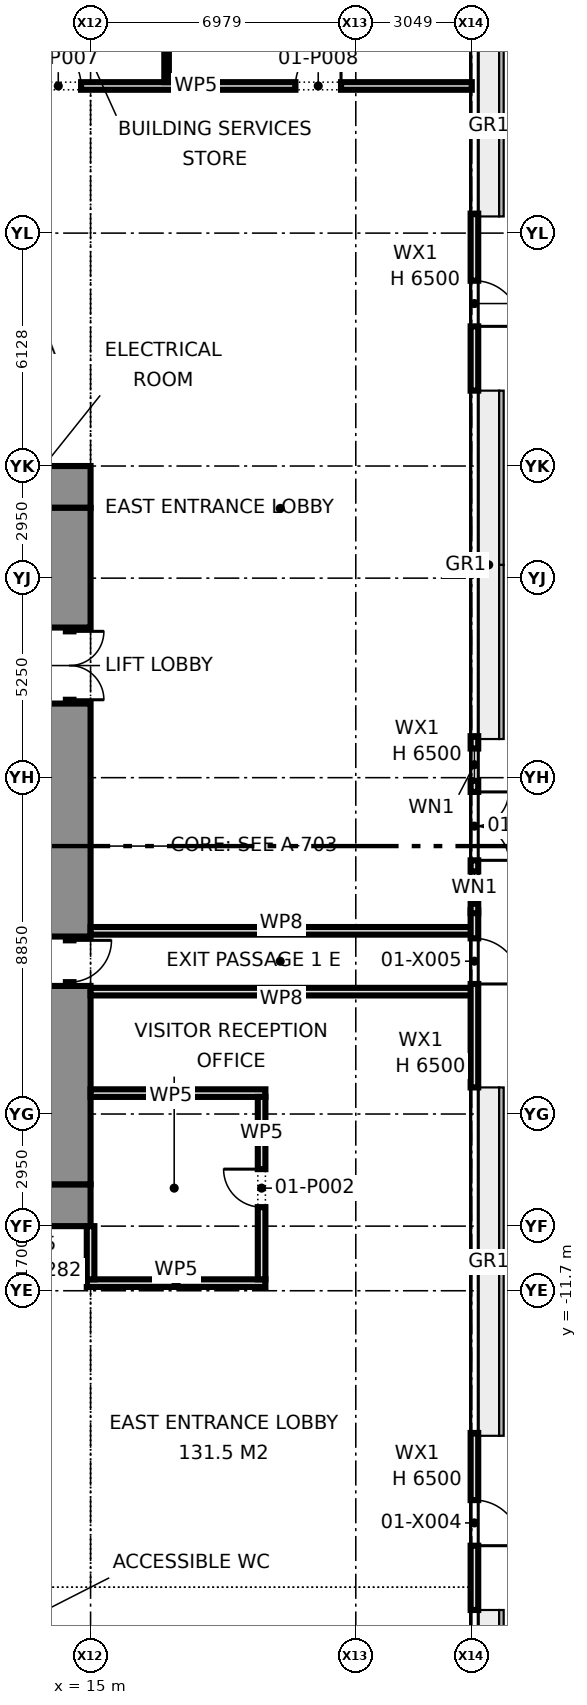
"""IFC4 building model, lengths in metres.
Left out: names, types, materials, properties, quantities, classifications, styles, units other than length and angle.
Written with IfcOpenShell. Run it as: python <this file> out.ifc"""

import sys

from ifc_helpers import new_model, si_unit, direction, frame, frame_2d, origin, place, context, subcontext, project, spatial, rectangle, extrude, element, fill, save


model = new_model("IFC4")
c1 = context("Model", 3, precision=1e-05, world=origin(), true_north=direction((0.0, 1.0)))
c2 = subcontext(c1, "Body", "Model", "MODEL_VIEW")
j1 = project(units=[si_unit("LENGTHUNIT", "METRE"), si_unit("PLANEANGLEUNIT", "RADIAN")], contexts=[c1])
p1 = place(None, origin())
s1 = spatial("IfcSite", under=j1, at=p1, CompositionType="ELEMENT")
p2 = place(p1, origin())
s2 = spatial("IfcBuilding", under=s1, at=p2, CompositionType="ELEMENT")
p3 = place(p2, origin())
s3 = spatial("IfcBuildingStorey", under=s2, at=p3, CompositionType="ELEMENT", Elevation=0.0)
p4 = place(p3, frame((25.1, -20.1, 0.0), z_axis=(0.0, 0.0, 1.0), x_axis=(0.0, 1.0, 0.0)))
e1 = element("IfcWall", 1, at=p4, inside=s3, PredefinedType="STANDARD", context=c2, shape_type="SweptSolid", body=[
    extrude(rectangle(XDim=4.658, YDim=0.2, at=frame_2d((2.329, 0.0))), origin(), (0.0, 0.0, 1.0), 6.5),
])
p5 = place(p4, frame((1.692, 0.0, 0.0)))
e2 = element("IfcOpeningElement", 2, at=p5, cuts=e1, PredefinedType="OPENING", context=c2, shape_type="SweptSolid", body=[
    extrude(rectangle(XDim=1.2, YDim=2.1, at=frame_2d((0.6, 1.05))), frame((0.0, 0.11, 0.0), z_axis=(0.0, -1.0, 0.0), x_axis=(1.0, 0.0, 0.0)), (0.0, 0.0, 1.0), 0.22),
])
p6 = place(p3, frame((25.1, -6.35, 0.0), z_axis=(0.0, 0.0, 1.0), x_axis=(0.0, 1.0, 0.0)))
e3 = element("IfcWall", 3, at=p6, inside=s3, PredefinedType="STANDARD", context=c2, shape_type="SweptSolid", body=[
    extrude(rectangle(XDim=4.658, YDim=0.2, at=frame_2d((2.329, 0.0))), origin(), (0.0, 0.0, 1.0), 6.5),
])
p7 = place(p6, frame((2.722, 0.0, 0.0)))
e4 = element("IfcOpeningElement", 4, at=p7, cuts=e3, PredefinedType="OPENING", context=c2, shape_type="SweptSolid", body=[
    extrude(rectangle(XDim=1.2, YDim=2.1, at=frame_2d((0.6, 1.05))), frame((0.0, 0.11, 0.0), z_axis=(0.0, -1.0, 0.0), x_axis=(1.0, 0.0, 0.0)), (0.0, 0.0, 1.0), 0.22),
])
p8 = place(p3, frame((25.1, -1.767, 0.0), z_axis=(0.0, 0.0, 1.0), x_axis=(0.0, 1.0, 0.0)))
e5 = element("IfcWall", 5, at=p8, inside=s3, PredefinedType="STANDARD", context=c2, shape_type="SweptSolid", body=[
    extrude(rectangle(XDim=4.658, YDim=0.2, at=frame_2d((2.329, 0.0))), origin(), (0.0, 0.0, 1.0), 6.5),
])
p9 = place(p8, frame((1.392, 0.0, 0.0)))
e6 = element("IfcOpeningElement", 6, at=p9, cuts=e5, PredefinedType="OPENING", context=c2, shape_type="SweptSolid", body=[
    extrude(rectangle(XDim=1.8, YDim=2.4, at=frame_2d((0.9, 1.2))), frame((0.0, 0.11, 0.0), z_axis=(0.0, -1.0, 0.0), x_axis=(1.0, 0.0, 0.0)), (0.0, 0.0, 1.0), 0.22),
])
p10 = place(p8, frame((0.25, 0.0, 0.0)))
e7 = element("IfcOpeningElement", 7, at=p10, cuts=e5, PredefinedType="OPENING", context=c2, shape_type="SweptSolid", body=[
    extrude(rectangle(XDim=0.85, YDim=2.4, at=frame_2d((0.425, 1.2))), frame((0.0, 0.11, 0.0), z_axis=(0.0, -1.0, 0.0), x_axis=(1.0, 0.0, 0.0)), (0.0, 0.0, 1.0), 0.22),
])
p11 = place(p8, frame((3.483, 0.0, 0.0)))
e8 = element("IfcOpeningElement", 8, at=p11, cuts=e5, PredefinedType="OPENING", context=c2, shape_type="SweptSolid", body=[
    extrude(rectangle(XDim=0.85, YDim=2.4, at=frame_2d((0.425, 1.2))), frame((0.0, 0.11, 0.0), z_axis=(0.0, -1.0, 0.0), x_axis=(1.0, 0.0, 0.0)), (0.0, 0.0, 1.0), 0.22),
])
p12 = place(p3, frame((25.1, 11.983, 0.0), z_axis=(0.0, 0.0, 1.0), x_axis=(0.0, 1.0, 0.0)))
e9 = element("IfcWall", 9, at=p12, inside=s3, PredefinedType="STANDARD", context=c2, shape_type="SweptSolid", body=[
    extrude(rectangle(XDim=4.658, YDim=0.2, at=frame_2d((2.329, 0.0))), origin(), (0.0, 0.0, 1.0), 6.5),
])
p13 = place(p12, frame((1.692, 0.0, 0.0)))
e10 = element("IfcOpeningElement", 10, at=p13, cuts=e9, PredefinedType="OPENING", context=c2, shape_type="SweptSolid", body=[
    extrude(rectangle(XDim=1.2, YDim=2.1, at=frame_2d((0.6, 1.05))), frame((0.0, 0.11, 0.0), z_axis=(0.0, -1.0, 0.0), x_axis=(1.0, 0.0, 0.0)), (0.0, 0.0, 1.0), 0.22),
])
for number, where, z_axis, x_axis in (
    (11, (15.0, 9.45, 0.0), (0.0, 0.0, 1.0), (-1.0, 0.0, 0.0)),
    (12, (15.0, -9.45, 0.0), (0.0, 0.0, 1.0), (-1.0, 0.0, 0.0)),
):
    element("IfcWall", number, at=place(p3, frame(where, z_axis=z_axis, x_axis=x_axis)), inside=s3, PredefinedType="SHEAR", context=c2, shape_type="SweptSolid", body=[
        extrude(rectangle(XDim=11.0, YDim=1.1, at=frame_2d((5.5, 0.0))), origin(), (0.0, 0.0, 1.0), 6.275),
    ])
p14 = place(p3, frame((14.45, 8.9, 0.0), z_axis=(0.0, 0.0, 1.0), x_axis=(0.0, -1.0, 0.0)))
e13 = element("IfcWall", 13, at=p14, inside=s3, PredefinedType="SHEAR", context=c2, shape_type="SweptSolid", body=[
    extrude(rectangle(XDim=3.15, YDim=1.1, at=frame_2d((1.575, 0.0))), origin(), (0.0, 0.0, 1.0), 6.275),
])
p15 = place(p3, frame((14.45, 5.75, 0.0), z_axis=(0.0, 0.0, 1.0), x_axis=(0.0, -1.0, 0.0)))
e14 = element("IfcWall", 14, at=p15, inside=s3, PredefinedType="PARTITIONING", context=c2, shape_type="SweptSolid", body=[
    extrude(rectangle(XDim=2.0, YDim=0.2, at=frame_2d((1.0, 0.0))), origin(), (0.0, 0.0, 1.0), 2.4),
])
p16 = place(p15, frame((0.1, 0.0, 0.0)))
e15 = element("IfcOpeningElement", 15, at=p16, cuts=e14, PredefinedType="OPENING", context=c2, shape_type="SweptSolid", body=[
    extrude(rectangle(XDim=1.8, YDim=2.1, at=frame_2d((0.9, 1.05))), frame((0.0, 0.11, 0.0), z_axis=(0.0, -1.0, 0.0), x_axis=(1.0, 0.0, 0.0)), (0.0, 0.0, 1.0), 0.22),
])
p17 = place(p3, frame((14.45, 3.75, 0.0), z_axis=(0.0, 0.0, 1.0), x_axis=(0.0, -1.0, 0.0)))
e16 = element("IfcWall", 16, at=p17, inside=s3, PredefinedType="SHEAR", context=c2, shape_type="SweptSolid", body=[
    extrude(rectangle(XDim=6.13, YDim=1.1, at=frame_2d((3.065, 0.0))), origin(), (0.0, 0.0, 1.0), 6.275),
])
p18 = place(p3, frame((14.45, -2.38, 0.0), z_axis=(0.0, 0.0, 1.0), x_axis=(0.0, -1.0, 0.0)))
e17 = element("IfcWall", 17, at=p18, inside=s3, PredefinedType="SHEAR", context=c2, shape_type="SweptSolid", body=[
    extrude(rectangle(XDim=1.3, YDim=0.2, at=frame_2d((0.65, 0.0))), origin(), (0.0, 0.0, 1.0), 2.4),
])
p19 = place(p18, frame((0.1, 0.0, 0.0)))
e18 = element("IfcOpeningElement", 18, at=p19, cuts=e17, PredefinedType="OPENING", context=c2, shape_type="SweptSolid", body=[
    extrude(rectangle(XDim=1.1, YDim=2.1, at=frame_2d((0.55, 1.05))), frame((0.0, 0.11, 0.0), z_axis=(0.0, -1.0, 0.0), x_axis=(1.0, 0.0, 0.0)), (0.0, 0.0, 1.0), 0.22),
])
p20 = place(p3, frame((14.45, -3.68, 0.0), z_axis=(0.0, 0.0, 1.0), x_axis=(0.0, -1.0, 0.0)))
e19 = element("IfcWall", 19, at=p20, inside=s3, PredefinedType="SHEAR", context=c2, shape_type="SweptSolid", body=[
    extrude(rectangle(XDim=5.22, YDim=1.1, at=frame_2d((2.61, 0.0))), origin(), (0.0, 0.0, 1.0), 6.275),
])
p21 = place(p3, frame((14.9, -11.5, 0.0), z_axis=(0.0, 0.0, 1.0), x_axis=(1.0, 0.0, 0.0)))
e20 = element("IfcWall", 20, at=p21, inside=s3, PredefinedType="PARTITIONING", context=c2, shape_type="SweptSolid", body=[
    extrude(rectangle(XDim=4.7, YDim=0.2, at=frame_2d((2.35, 0.0))), origin(), (0.0, 0.0, 1.0), 6.275),
])
p22 = place(p3, frame((15.0, -6.5, 0.0), z_axis=(0.0, 0.0, 1.0), x_axis=(1.0, 0.0, 0.0)))
e21 = element("IfcWall", 21, at=p22, inside=s3, PredefinedType="PARTITIONING", context=c2, shape_type="SweptSolid", body=[
    extrude(rectangle(XDim=4.6, YDim=0.2, at=frame_2d((2.3, 0.0))), origin(), (0.0, 0.0, 1.0), 6.275),
])
p23 = place(p3, frame((11.2, 20.0, 0.0), z_axis=(0.0, 0.0, 1.0), x_axis=(1.0, 0.0, 0.0)))
e22 = element("IfcWall", 22, at=p23, inside=s3, PredefinedType="PARTITIONING", context=c2, shape_type="SweptSolid", body=[
    extrude(rectangle(XDim=13.83, YDim=0.2, at=frame_2d((6.915, 0.0))), origin(), (0.0, 0.0, 1.0), 6.275),
])
p24 = place(p23, frame((2.35, 0.0, 0.0)))
e23 = element("IfcOpeningElement", 23, at=p24, cuts=e22, PredefinedType="OPENING", context=c2, shape_type="SweptSolid", body=[
    extrude(rectangle(XDim=1.2, YDim=2.1, at=frame_2d((0.6, 1.05))), frame((0.0, 0.11, 0.0), z_axis=(0.0, -1.0, 0.0), x_axis=(1.0, 0.0, 0.0)), (0.0, 0.0, 1.0), 0.22),
])
p25 = place(p23, frame((9.19, 0.0, 0.0)))
e24 = element("IfcOpeningElement", 24, at=p25, cuts=e22, PredefinedType="OPENING", context=c2, shape_type="SweptSolid", body=[
    extrude(rectangle(XDim=1.2, YDim=2.1, at=frame_2d((0.6, 1.05))), frame((0.0, 0.11, 0.0), z_axis=(0.0, -1.0, 0.0), x_axis=(1.0, 0.0, 0.0)), (0.0, 0.0, 1.0), 0.22),
])
p26 = place(p3, frame((19.5, -11.4, 0.0), z_axis=(0.0, 0.0, 1.0), x_axis=(0.0, 1.0, 0.0)))
e25 = element("IfcWall", 25, at=p26, inside=s3, PredefinedType="PARTITIONING", context=c2, shape_type="SweptSolid", body=[
    extrude(rectangle(XDim=4.8, YDim=0.2, at=frame_2d((2.4, 0.0))), origin(), (0.0, 0.0, 1.0), 6.275),
])
p27 = place(p26, frame((1.9, 0.0, 0.0)))
e26 = element("IfcOpeningElement", 26, at=p27, cuts=e25, PredefinedType="OPENING", context=c2, shape_type="SweptSolid", body=[
    extrude(rectangle(XDim=1.0, YDim=2.1, at=frame_2d((0.5, 1.05))), frame((0.0, 0.11, 0.0), z_axis=(0.0, -1.0, 0.0), x_axis=(1.0, 0.0, 0.0)), (0.0, 0.0, 1.0), 0.22),
])
p28 = place(p3, frame((15.0, -11.4, 0.0), z_axis=(0.0, 0.0, 1.0), x_axis=(0.0, 1.0, 0.0)))
e27 = element("IfcWall", 27, at=p28, inside=s3, PredefinedType="PARTITIONING", context=c2, shape_type="SweptSolid", body=[
    extrude(rectangle(XDim=1.4, YDim=0.2, at=frame_2d((0.7, 0.0))), origin(), (0.0, 0.0, 1.0), 5.282),
])
p29 = place(p3, frame((17.0, 20.1, 0.0), z_axis=(0.0, 0.0, 1.0), x_axis=(0.0, 1.0, 0.0)))
e28 = element("IfcWall", 28, at=p29, inside=s3, PredefinedType="PARTITIONING", context=c2, shape_type="SweptSolid", body=[
    extrude(rectangle(XDim=4.93, YDim=0.12, at=frame_2d((2.465, 0.0))), origin(), (0.0, 0.0, 1.0), 6.275),
])
for number, where, z_axis, x_axis in (
    (29, (15.0, -3.83, 0.0), (0.0, 0.0, 1.0), (1.0, 0.0, 0.0)),
    (30, (15.0, -2.23, 0.0), (0.0, 0.0, 1.0), (1.0, 0.0, 0.0)),
):
    element("IfcWall", number, at=place(p3, frame(where, z_axis=z_axis, x_axis=x_axis)), inside=s3, PredefinedType="PARTITIONING", context=c2, shape_type="SweptSolid", body=[
        extrude(rectangle(XDim=10.03, YDim=0.2, at=frame_2d((5.015, 0.0))), origin(), (0.0, 0.0, 1.0), 6.275),
    ])
p30 = place(p5, frame((1.2, 0.0, 0.0), z_axis=(0.0, 0.0, 1.0), x_axis=(-1.0, 0.0, 0.0)))
e31 = element("IfcDoor", 31, at=p30, inside=s3, OperationType="SINGLE_SWING_RIGHT", PredefinedType="DOOR", context=c2, shape_type="SweptSolid", body=[
    extrude(rectangle(XDim=1.2, YDim=2.1, at=frame_2d((0.6, 1.05))), frame((0.0, 0.025, 0.0), z_axis=(0.0, -1.0, 0.0), x_axis=(1.0, 0.0, 0.0)), (0.0, 0.0, 1.0), 0.05),
])
fill(e2, e31)
p31 = place(p7, frame((1.2, 0.0, 0.0), z_axis=(0.0, 0.0, 1.0), x_axis=(-1.0, 0.0, 0.0)))
e32 = element("IfcDoor", 32, at=p31, inside=s3, OperationType="SINGLE_SWING_RIGHT", PredefinedType="DOOR", context=c2, shape_type="SweptSolid", body=[
    extrude(rectangle(XDim=1.2, YDim=2.1, at=frame_2d((0.6, 1.05))), frame((0.0, 0.025, 0.0), z_axis=(0.0, -1.0, 0.0), x_axis=(1.0, 0.0, 0.0)), (0.0, 0.0, 1.0), 0.05),
])
fill(e4, e32)
p32 = place(p9, frame((1.8, 0.0, 0.0), z_axis=(0.0, 0.0, 1.0), x_axis=(-1.0, 0.0, 0.0)))
e33 = element("IfcDoor", 33, at=p32, inside=s3, OperationType="DOUBLE_DOOR_DOUBLE_SWING", PredefinedType="DOOR", context=c2, shape_type="SweptSolid", body=[
    extrude(rectangle(XDim=1.8, YDim=2.4, at=frame_2d((0.9, 1.2))), frame((0.0, 0.025, 0.0), z_axis=(0.0, -1.0, 0.0), x_axis=(1.0, 0.0, 0.0)), (0.0, 0.0, 1.0), 0.05),
])
fill(e6, e33)
p33 = place(p10, origin())
e34 = element("IfcWindow", 34, at=p33, inside=s3, PartitioningType="SINGLE_PANEL", PredefinedType="WINDOW", context=c2, shape_type="SweptSolid", body=[
    extrude(rectangle(XDim=0.85, YDim=2.4, at=frame_2d((0.425, 1.2))), frame((0.0, 0.03, 0.0), z_axis=(0.0, -1.0, 0.0), x_axis=(1.0, 0.0, 0.0)), (0.0, 0.0, 1.0), 0.06),
])
fill(e7, e34)
p34 = place(p11, origin())
e35 = element("IfcWindow", 35, at=p34, inside=s3, PartitioningType="SINGLE_PANEL", PredefinedType="WINDOW", context=c2, shape_type="SweptSolid", body=[
    extrude(rectangle(XDim=0.85, YDim=2.4, at=frame_2d((0.425, 1.2))), frame((0.0, 0.03, 0.0), z_axis=(0.0, -1.0, 0.0), x_axis=(1.0, 0.0, 0.0)), (0.0, 0.0, 1.0), 0.06),
])
fill(e8, e35)
p35 = place(p13, frame((1.2, 0.0, 0.0), z_axis=(0.0, 0.0, 1.0), x_axis=(-1.0, 0.0, 0.0)))
e36 = element("IfcDoor", 36, at=p35, inside=s3, OperationType="SINGLE_SWING_RIGHT", PredefinedType="DOOR", context=c2, shape_type="SweptSolid", body=[
    extrude(rectangle(XDim=1.2, YDim=2.1, at=frame_2d((0.6, 1.05))), frame((0.0, 0.025, 0.0), z_axis=(0.0, -1.0, 0.0), x_axis=(1.0, 0.0, 0.0)), (0.0, 0.0, 1.0), 0.05),
])
fill(e10, e36)
p36 = place(p16, origin())
e37 = element("IfcDoor", 37, at=p36, inside=s3, OperationType="DOUBLE_DOOR_SINGLE_SWING", PredefinedType="DOOR", context=c2, shape_type="SweptSolid", body=[
    extrude(rectangle(XDim=1.8, YDim=2.1, at=frame_2d((0.9, 1.05))), frame((0.0, 0.025, 0.0), z_axis=(0.0, -1.0, 0.0), x_axis=(1.0, 0.0, 0.0)), (0.0, 0.0, 1.0), 0.05),
])
fill(e15, e37)
p37 = place(p19, origin())
e38 = element("IfcDoor", 38, at=p37, inside=s3, OperationType="SINGLE_SWING_LEFT", PredefinedType="DOOR", context=c2, shape_type="SweptSolid", body=[
    extrude(rectangle(XDim=1.1, YDim=2.1, at=frame_2d((0.55, 1.05))), frame((0.0, 0.025, 0.0), z_axis=(0.0, -1.0, 0.0), x_axis=(1.0, 0.0, 0.0)), (0.0, 0.0, 1.0), 0.05),
])
fill(e18, e38)
p38 = place(p27, origin())
e39 = element("IfcDoor", 39, at=p38, inside=s3, OperationType="SINGLE_SWING_RIGHT", PredefinedType="DOOR", context=c2, shape_type="SweptSolid", body=[
    extrude(rectangle(XDim=1.0, YDim=2.1, at=frame_2d((0.5, 1.05))), frame((0.0, 0.025, 0.0), z_axis=(0.0, -1.0, 0.0), x_axis=(1.0, 0.0, 0.0)), (0.0, 0.0, 1.0), 0.05),
])
fill(e26, e39)
p39 = place(p24, origin())
e40 = element("IfcDoor", 40, at=p39, inside=s3, OperationType="SINGLE_SWING_LEFT", PredefinedType="DOOR", context=c2, shape_type="SweptSolid", body=[
    extrude(rectangle(XDim=1.2, YDim=2.1, at=frame_2d((0.6, 1.05))), frame((0.0, 0.025, 0.0), z_axis=(0.0, -1.0, 0.0), x_axis=(1.0, 0.0, 0.0)), (0.0, 0.0, 1.0), 0.05),
])
fill(e23, e40)
p40 = place(p25, origin())
e41 = element("IfcDoor", 41, at=p40, inside=s3, OperationType="SINGLE_SWING_RIGHT", PredefinedType="DOOR", context=c2, shape_type="SweptSolid", body=[
    extrude(rectangle(XDim=1.2, YDim=2.1, at=frame_2d((0.6, 1.05))), frame((0.0, 0.025, 0.0), z_axis=(0.0, -1.0, 0.0), x_axis=(1.0, 0.0, 0.0)), (0.0, 0.0, 1.0), 0.05),
])
fill(e24, e41)
save(model, sys.argv[1])
